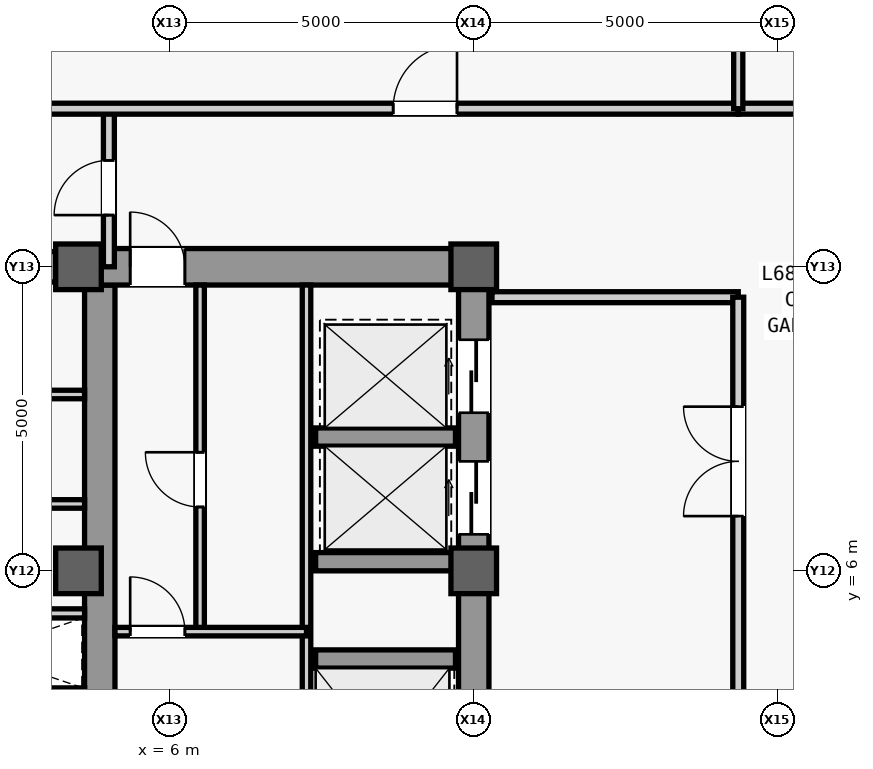
"""IFC4 building model, lengths in metres.
Left out: names, types, materials, properties, quantities, classifications, styles, units other than length and angle.
Written with IfcOpenShell. Run it as: python <this file> out.ifc"""

import sys

from ifc_helpers import new_model, si_unit, direction, frame, frame_2d, origin, origin_2d, place, context, subcontext, project, spatial, rectangle, extrude, source, transform, mapped, element, fill, save


model = new_model("IFC4")
c1 = context("Model", 3, precision=1e-05, world=origin(), true_north=direction((0.0, 1.0)))
c2 = subcontext(c1, "Body", "Model", "MODEL_VIEW")
j1 = project(units=[si_unit("LENGTHUNIT", "METRE"), si_unit("PLANEANGLEUNIT", "RADIAN")], contexts=[c1])
p1 = place(None, origin())
s1 = spatial("IfcSite", under=j1, at=p1, CompositionType="ELEMENT")
p2 = place(p1, origin())
s2 = spatial("IfcBuilding", under=s1, at=p2, CompositionType="ELEMENT")
p3 = place(p2, frame((0.0, 0.0, 289.5)))
s3 = spatial("IfcBuildingStorey", under=s2, at=p3, CompositionType="ELEMENT", Elevation=289.5)
m1 = source(origin(), c2, "Body", "SweptSolid", [
    extrude(rectangle(XDim=22.0, YDim=0.5, at=frame_2d((11.0, 0.0))), origin(), (0.0, 0.0, 1.0), 3.78),
])
p4 = place(p3, frame((11.0, -11.0, 0.0), z_axis=(0.0, 0.0, 1.0), x_axis=(0.0, 1.0, 0.0)))
e1 = element("IfcWall", 1, at=p4, inside=s3, PredefinedType="SHEAR", context=c2, shape_type="MappedRepresentation", body=[
    mapped(m1, transform((0.0, 0.0, 0.0), scale=1.0)),
])
m2 = source(origin(), c2, "Body", "SweptSolid", [
    extrude(rectangle(XDim=1.1, YDim=2.2, at=frame_2d((0.55, 1.1))), frame((0.0, 0.26, 0.0), z_axis=(0.0, -1.0, 0.0), x_axis=(1.0, 0.0, 0.0)), (0.0, 0.0, 1.0), 0.52),
])
p5 = place(p4, frame((0.8, 0.0, 0.0)))
e2 = element("IfcOpeningElement", 2, at=p5, cuts=e1, PredefinedType="OPENING", context=c2, shape_type="MappedRepresentation", body=[
    mapped(m2, transform((0.0, 0.0, 0.0), scale=1.0)),
])
m3 = source(origin(), c2, "Body", "SweptSolid", [
    extrude(rectangle(XDim=0.9, YDim=2.15, at=frame_2d((0.45, 1.075))), frame((0.0, 0.26, 0.0), z_axis=(0.0, -1.0, 0.0), x_axis=(1.0, 0.0, 0.0)), (0.0, 0.0, 1.0), 0.52),
])
p6 = place(p4, frame((7.575, 0.0, 0.0)))
e3 = element("IfcOpeningElement", 3, at=p6, cuts=e1, PredefinedType="OPENING", context=c2, shape_type="MappedRepresentation", body=[
    mapped(m3, transform((0.0, 0.0, 0.0), scale=1.0)),
])
m4 = source(origin(), c2, "Body", "SweptSolid", [
    extrude(rectangle(XDim=1.2, YDim=2.3, at=frame_2d((0.6, 1.15))), frame((0.0, 0.26, 0.0), z_axis=(0.0, -1.0, 0.0), x_axis=(1.0, 0.0, 0.0)), (0.0, 0.0, 1.0), 0.52),
])
p7 = place(p4, frame((17.6, 0.0, 0.0)))
e4 = element("IfcOpeningElement", 4, at=p7, cuts=e1, PredefinedType="OPENING", context=c2, shape_type="MappedRepresentation", body=[
    mapped(m4, transform((0.0, 0.0, 0.0), scale=1.0)),
])
p8 = place(p4, frame((19.6, 0.0, 0.0)))
e5 = element("IfcOpeningElement", 5, at=p8, cuts=e1, PredefinedType="OPENING", context=c2, shape_type="MappedRepresentation", body=[
    mapped(m4, transform((0.0, 0.0, 0.0), scale=1.0)),
])
m5 = source(origin(), c2, "Body", "SweptSolid", [
    extrude(rectangle(XDim=1.3, YDim=2.3, at=frame_2d((0.65, 1.15))), frame((0.0, 0.26, 0.0), z_axis=(0.0, -1.0, 0.0), x_axis=(1.0, 0.0, 0.0)), (0.0, 0.0, 1.0), 0.52),
])
p9 = place(p4, frame((2.7, 0.0, 0.0)))
e6 = element("IfcOpeningElement", 6, at=p9, cuts=e1, PredefinedType="OPENING", context=c2, shape_type="MappedRepresentation", body=[
    mapped(m5, transform((0.0, 0.0, 0.0), scale=1.0)),
])
p10 = place(p4, frame((13.35, 0.0, 0.0)))
e7 = element("IfcOpeningElement", 7, at=p10, cuts=e1, PredefinedType="OPENING", context=c2, shape_type="MappedRepresentation", body=[
    mapped(m5, transform((0.0, 0.0, 0.0), scale=1.0)),
])
m6 = source(origin(), c2, "Body", "SweptSolid", [
    extrude(rectangle(XDim=21.4, YDim=0.5, at=frame_2d((10.7, 0.0))), origin(), (0.0, 0.0, 1.0), 3.78),
])
p11 = place(p3, frame((4.85, -10.7, 0.0), z_axis=(0.0, 0.0, 1.0), x_axis=(0.0, 1.0, 0.0)))
e8 = element("IfcWall", 8, at=p11, inside=s3, PredefinedType="SHEAR", context=c2, shape_type="MappedRepresentation", body=[
    mapped(m6, transform((0.0, 0.0, 0.0), scale=1.0)),
])
m7 = source(origin(), c2, "Body", "SweptSolid", [
    extrude(rectangle(XDim=5.9, YDim=0.6, at=frame_2d((2.95, 0.0))), origin(), (0.0, 0.0, 1.0), 3.78),
])
p12 = place(p3, frame((4.85, 11.0, 0.0), z_axis=(0.0, 0.0, 1.0), x_axis=(1.0, 0.0, 0.0)))
e9 = element("IfcWall", 9, at=p12, inside=s3, PredefinedType="SHEAR", context=c2, shape_type="MappedRepresentation", body=[
    mapped(m7, transform((0.0, 0.0, 0.0), scale=1.0)),
])
m8 = source(origin(), c2, "Body", "SweptSolid", [
    extrude(rectangle(XDim=0.9, YDim=2.15, at=frame_2d((0.45, 1.075))), frame((0.0, 0.31, 0.0), z_axis=(0.0, -1.0, 0.0), x_axis=(1.0, 0.0, 0.0)), (0.0, 0.0, 1.0), 0.62),
])
p13 = place(p12, frame((0.5, 0.0, 0.0)))
e10 = element("IfcOpeningElement", 10, at=p13, cuts=e9, PredefinedType="OPENING", context=c2, shape_type="MappedRepresentation", body=[
    mapped(m8, transform((0.0, 0.0, 0.0), scale=1.0)),
])
m9 = source(origin(), c2, "Body", "SweptSolid", [
    extrude(rectangle(XDim=9.2, YDim=0.5, at=frame_2d((4.6, 0.0))), origin(), (0.0, 0.0, 1.0), 3.78),
])
p14 = place(p3, frame((-4.6, 11.0, 0.0), z_axis=(0.0, 0.0, 1.0), x_axis=(1.0, 0.0, 0.0)))
e11 = element("IfcWall", 11, at=p14, inside=s3, PredefinedType="SHEAR", context=c2, shape_type="MappedRepresentation", body=[
    mapped(m9, transform((0.0, 0.0, 0.0), scale=1.0)),
])
m10 = source(origin(), c2, "Body", "SweptSolid", [
    extrude(rectangle(XDim=0.75, YDim=0.75, at=origin_2d()), origin(), (0.0, 0.0, 1.0), 4.0),
])
for number, where, z_axis, x_axis in (
    (12, (4.5, 6.0, 0.0), (0.0, 0.0, 1.0), (1.0, 0.0, 0.0)),
    (13, (4.5, 11.0, 0.0), (0.0, 0.0, 1.0), (1.0, 0.0, 0.0)),
    (14, (11.0, 6.0, 0.0), (0.0, 0.0, 1.0), (1.0, 0.0, 0.0)),
    (15, (11.0, 11.0, 0.0), (0.0, 0.0, 1.0), (1.0, 0.0, 0.0)),
):
    element("IfcColumn", number, at=place(p3, frame(where, z_axis=z_axis, x_axis=x_axis)), inside=s3, PredefinedType="COLUMN", context=c2, shape_type="MappedRepresentation", body=[
        mapped(m10, transform((0.0, 0.0, 0.0), scale=1.0)),
    ])
m11 = source(origin(), c2, "Body", "SweptSolid", [
    extrude(rectangle(XDim=2.3, YDim=0.3, at=frame_2d((1.15, 0.0))), origin(), (0.0, 0.0, 1.0), 3.78),
])
for number, where, z_axis, x_axis in (
    (16, (8.4, 4.55, 0.0), (0.0, 0.0, 1.0), (1.0, 0.0, 0.0)),
    (17, (8.4, 6.15, 0.0), (0.0, 0.0, 1.0), (1.0, 0.0, 0.0)),
    (18, (8.4, 8.2, 0.0), (0.0, 0.0, 1.0), (1.0, 0.0, 0.0)),
):
    element("IfcWall", number, at=place(p3, frame(where, z_axis=z_axis, x_axis=x_axis)), inside=s3, PredefinedType="SHEAR", context=c2, shape_type="MappedRepresentation", body=[
        mapped(m11, transform((0.0, 0.0, 0.0), scale=1.0)),
    ])
m12 = source(origin(), c2, "Body", "SweptSolid", [
    extrude(rectangle(XDim=9.4, YDim=0.14, at=frame_2d((4.7, 0.0))), origin(), (0.0, 0.0, 1.0), 3.78),
])
p15 = place(p3, frame((8.25, 1.3, 0.0), z_axis=(0.0, 0.0, 1.0), x_axis=(0.0, 1.0, 0.0)))
e19 = element("IfcWall", 19, at=p15, inside=s3, PredefinedType="PARTITIONING", context=c2, shape_type="MappedRepresentation", body=[
    mapped(m12, transform((0.0, 0.0, 0.0), scale=1.0)),
])
m13 = source(origin(), c2, "Body", "SweptSolid", [
    extrude(rectangle(XDim=5.7, YDim=0.14, at=frame_2d((2.85, 0.0))), origin(), (0.0, 0.0, 1.0), 3.78),
])
p16 = place(p3, frame((6.5, 5.0, 0.0), z_axis=(0.0, 0.0, 1.0), x_axis=(0.0, 1.0, 0.0)))
e20 = element("IfcWall", 20, at=p16, inside=s3, PredefinedType="PARTITIONING", context=c2, shape_type="MappedRepresentation", body=[
    mapped(m13, transform((0.0, 0.0, 0.0), scale=1.0)),
])
m14 = source(origin(), c2, "Body", "SweptSolid", [
    extrude(rectangle(XDim=0.9, YDim=2.15, at=frame_2d((0.45, 1.075))), frame((0.0, 0.08, 0.0), z_axis=(0.0, -1.0, 0.0), x_axis=(1.0, 0.0, 0.0)), (0.0, 0.0, 1.0), 0.16),
])
p17 = place(p16, frame((2.05, 0.0, 0.0)))
e21 = element("IfcOpeningElement", 21, at=p17, cuts=e20, PredefinedType="OPENING", context=c2, shape_type="MappedRepresentation", body=[
    mapped(m14, transform((0.0, 0.0, 0.0), scale=1.0)),
])
m15 = source(origin(), c2, "Body", "SweptSolid", [
    extrude(rectangle(XDim=3.15, YDim=0.14, at=frame_2d((1.575, 0.0))), origin(), (0.0, 0.0, 1.0), 3.78),
])
p18 = place(p3, frame((5.1, 5.0, 0.0), z_axis=(0.0, 0.0, 1.0), x_axis=(1.0, 0.0, 0.0)))
e22 = element("IfcWall", 22, at=p18, inside=s3, PredefinedType="PARTITIONING", context=c2, shape_type="MappedRepresentation", body=[
    mapped(m15, transform((0.0, 0.0, 0.0), scale=1.0)),
])
p19 = place(p18, frame((0.25, 0.0, 0.0)))
e23 = element("IfcOpeningElement", 23, at=p19, cuts=e22, PredefinedType="OPENING", context=c2, shape_type="MappedRepresentation", body=[
    mapped(m14, transform((0.0, 0.0, 0.0), scale=1.0)),
])
m16 = source(origin(), c2, "Body", "SweptSolid", [
    extrude(rectangle(XDim=4.05, YDim=0.18, at=frame_2d((2.025, 0.0))), origin(), (0.0, 0.0, 1.0), 3.78),
])
p20 = place(p3, frame((11.3, 10.5, 0.0), z_axis=(0.0, 0.0, 1.0), x_axis=(1.0, 0.0, 0.0)))
e24 = element("IfcWall", 24, at=p20, inside=s3, PredefinedType="PARTITIONING", context=c2, shape_type="MappedRepresentation", body=[
    mapped(m16, transform((0.0, 0.0, 0.0), scale=1.0)),
])
m17 = source(origin(), c2, "Body", "SweptSolid", [
    extrude(rectangle(XDim=16.6, YDim=0.18, at=frame_2d((8.3, 0.0))), origin(), (0.0, 0.0, 1.0), 3.78),
])
p21 = place(p3, frame((15.35, -6.1, 0.0), z_axis=(0.0, 0.0, 1.0), x_axis=(0.0, 1.0, 0.0)))
e25 = element("IfcWall", 25, at=p21, inside=s3, PredefinedType="PARTITIONING", context=c2, shape_type="MappedRepresentation", body=[
    mapped(m17, transform((0.0, 0.0, 0.0), scale=1.0)),
])
m18 = source(origin(), c2, "Body", "SweptSolid", [
    extrude(rectangle(XDim=1.8, YDim=2.25, at=frame_2d((0.9, 1.125))), frame((0.0, 0.1, 0.0), z_axis=(0.0, -1.0, 0.0), x_axis=(1.0, 0.0, 0.0)), (0.0, 0.0, 1.0), 0.2),
])
p22 = place(p21, frame((2.7, 0.0, 0.0)))
e26 = element("IfcOpeningElement", 26, at=p22, cuts=e25, PredefinedType="OPENING", context=c2, shape_type="MappedRepresentation", body=[
    mapped(m18, transform((0.0, 0.0, 0.0), scale=1.0)),
])
p23 = place(p21, frame((13.0, 0.0, 0.0)))
e27 = element("IfcOpeningElement", 27, at=p23, cuts=e25, PredefinedType="OPENING", context=c2, shape_type="MappedRepresentation", body=[
    mapped(m18, transform((0.0, 0.0, 0.0), scale=1.0)),
])
m19 = source(origin(), c2, "Body", "SweptSolid", [
    extrude(rectangle(XDim=3.45, YDim=0.15, at=frame_2d((1.725, 0.0))), origin(), (0.0, 0.0, 1.0), 3.78),
])
p24 = place(p3, frame((1.15, 4.0, 0.0), z_axis=(0.0, 0.0, 1.0), x_axis=(1.0, 0.0, 0.0)))
e28 = element("IfcWall", 28, at=p24, inside=s3, PredefinedType="PARTITIONING", context=c2, shape_type="MappedRepresentation", body=[
    mapped(m19, transform((0.0, 0.0, 0.0), scale=1.0)),
])
m20 = source(origin(), c2, "Body", "SweptSolid", [
    extrude(rectangle(XDim=3.45, YDim=0.14, at=frame_2d((1.725, 0.0))), origin(), (0.0, 0.0, 1.0), 3.78),
])
for number, where, z_axis, x_axis in (
    (29, (1.15, 7.1, 0.0), (0.0, 0.0, 1.0), (1.0, 0.0, 0.0)),
    (30, (1.15, 8.9, 0.0), (0.0, 0.0, 1.0), (1.0, 0.0, 0.0)),
):
    element("IfcWall", number, at=place(p3, frame(where, z_axis=z_axis, x_axis=x_axis)), inside=s3, PredefinedType="PARTITIONING", context=c2, shape_type="MappedRepresentation", body=[
        mapped(m20, transform((0.0, 0.0, 0.0), scale=1.0)),
    ])
p25 = place(p3, frame((1.15, 5.3, 0.0), z_axis=(0.0, 0.0, 1.0), x_axis=(1.0, 0.0, 0.0)))
e31 = element("IfcWall", 31, at=p25, inside=s3, PredefinedType="PARTITIONING", context=c2, shape_type="MappedRepresentation", body=[
    mapped(m19, transform((0.0, 0.0, 0.0), scale=1.0)),
])
m21 = source(origin(), c2, "Body", "SweptSolid", [
    extrude(rectangle(XDim=2.6, YDim=0.18, at=frame_2d((1.3, 0.0))), origin(), (0.0, 0.0, 1.0), 3.78),
])
p26 = place(p3, frame((5.0, 11.0, 0.0), z_axis=(0.0, 0.0, 1.0), x_axis=(0.0, 1.0, 0.0)))
e32 = element("IfcWall", 32, at=p26, inside=s3, PredefinedType="PARTITIONING", context=c2, shape_type="MappedRepresentation", body=[
    mapped(m21, transform((0.0, 0.0, 0.0), scale=1.0)),
])
m22 = source(origin(), c2, "Body", "SweptSolid", [
    extrude(rectangle(XDim=0.9, YDim=2.15, at=frame_2d((0.45, 1.075))), frame((0.0, 0.1, 0.0), z_axis=(0.0, -1.0, 0.0), x_axis=(1.0, 0.0, 0.0)), (0.0, 0.0, 1.0), 0.2),
])
p27 = place(p26, frame((0.85, 0.0, 0.0)))
e33 = element("IfcOpeningElement", 33, at=p27, cuts=e32, PredefinedType="OPENING", context=c2, shape_type="MappedRepresentation", body=[
    mapped(m22, transform((0.0, 0.0, 0.0), scale=1.0)),
])
m23 = source(origin(), c2, "Body", "SweptSolid", [
    extrude(rectangle(XDim=2.4, YDim=0.18, at=frame_2d((1.2, 0.0))), origin(), (0.0, 0.0, 1.0), 3.78),
])
p28 = place(p3, frame((15.35, 13.6, 0.0), z_axis=(0.0, 0.0, 1.0), x_axis=(1.0, 0.0, 0.0)))
e34 = element("IfcWall", 34, at=p28, inside=s3, PredefinedType="PARTITIONING", context=c2, shape_type="MappedRepresentation", body=[
    mapped(m23, transform((0.0, 0.0, 0.0), scale=1.0)),
])
m24 = source(origin(), c2, "Body", "SweptSolid", [
    extrude(rectangle(XDim=32.75, YDim=0.18, at=frame_2d((16.375, 0.0))), origin(), (0.0, 0.0, 1.0), 3.78),
])
p29 = place(p3, frame((-17.4, 13.6, 0.0), z_axis=(0.0, 0.0, 1.0), x_axis=(1.0, 0.0, 0.0)))
e35 = element("IfcWall", 35, at=p29, inside=s3, PredefinedType="PARTITIONING", context=c2, shape_type="MappedRepresentation", body=[
    mapped(m24, transform((0.0, 0.0, 0.0), scale=1.0)),
])
m25 = source(origin(), c2, "Body", "SweptSolid", [
    extrude(rectangle(XDim=1.05, YDim=2.2, at=frame_2d((0.525, 1.1))), frame((0.0, 0.1, 0.0), z_axis=(0.0, -1.0, 0.0), x_axis=(1.0, 0.0, 0.0)), (0.0, 0.0, 1.0), 0.2),
])
p30 = place(p29, frame((27.075, 0.0, 0.0)))
e36 = element("IfcOpeningElement", 36, at=p30, cuts=e35, PredefinedType="OPENING", context=c2, shape_type="MappedRepresentation", body=[
    mapped(m25, transform((0.0, 0.0, 0.0), scale=1.0)),
])
m26 = source(origin(), c2, "Body", "SweptSolid", [
    extrude(rectangle(XDim=14.4, YDim=0.15, at=frame_2d((7.2, 0.0))), origin(), (0.0, 0.0, 1.0), 3.78),
])
p31 = place(p3, frame((15.35, 13.6, 0.0), z_axis=(0.0, 0.0, 1.0), x_axis=(0.0, 1.0, 0.0)))
e37 = element("IfcWall", 37, at=p31, inside=s3, PredefinedType="PARTITIONING", context=c2, shape_type="MappedRepresentation", body=[
    mapped(m26, transform((0.0, 0.0, 0.0), scale=1.0)),
])
m27 = source(origin(), c2, "Body", "SweptSolid", [
    extrude(rectangle(XDim=0.9, YDim=2.15, at=frame_2d((0.45, 1.075))), frame((0.0, 0.025, 0.0), z_axis=(0.0, -1.0, 0.0), x_axis=(1.0, 0.0, 0.0)), (0.0, 0.0, 1.0), 0.05),
])
p32 = place(p13, origin())
e38 = element("IfcDoor", 38, at=p32, inside=s3, OperationType="SINGLE_SWING_LEFT", PredefinedType="DOOR", context=c2, shape_type="MappedRepresentation", body=[
    mapped(m27, transform((0.0, 0.0, 0.0), scale=1.0)),
])
fill(e10, e38)
p33 = place(p17, origin())
e39 = element("IfcDoor", 39, at=p33, inside=s3, OperationType="SINGLE_SWING_RIGHT", PredefinedType="DOOR", context=c2, shape_type="MappedRepresentation", body=[
    mapped(m27, transform((0.0, 0.0, 0.0), scale=1.0)),
])
fill(e21, e39)
p34 = place(p19, origin())
e40 = element("IfcDoor", 40, at=p34, inside=s3, OperationType="SINGLE_SWING_LEFT", PredefinedType="DOOR", context=c2, shape_type="MappedRepresentation", body=[
    mapped(m27, transform((0.0, 0.0, 0.0), scale=1.0)),
])
fill(e23, e40)
m28 = source(origin(), c2, "Body", "SweptSolid", [
    extrude(rectangle(XDim=1.8, YDim=2.25, at=frame_2d((0.9, 1.125))), frame((0.0, 0.025, 0.0), z_axis=(0.0, -1.0, 0.0), x_axis=(1.0, 0.0, 0.0)), (0.0, 0.0, 1.0), 0.05),
])
p35 = place(p23, origin())
e41 = element("IfcDoor", 41, at=p35, inside=s3, OperationType="SINGLE_SWING_LEFT", PredefinedType="DOOR", context=c2, shape_type="MappedRepresentation", body=[
    mapped(m28, transform((0.0, 0.0, 0.0), scale=1.0)),
])
fill(e27, e41)
p36 = place(p27, origin())
e42 = element("IfcDoor", 42, at=p36, inside=s3, OperationType="SINGLE_SWING_LEFT", PredefinedType="DOOR", context=c2, shape_type="MappedRepresentation", body=[
    mapped(m27, transform((0.0, 0.0, 0.0), scale=1.0)),
])
fill(e33, e42)
m29 = source(origin(), c2, "Body", "SweptSolid", [
    extrude(rectangle(XDim=1.05, YDim=2.2, at=frame_2d((0.525, 1.1))), frame((0.0, 0.025, 0.0), z_axis=(0.0, -1.0, 0.0), x_axis=(1.0, 0.0, 0.0)), (0.0, 0.0, 1.0), 0.05),
])
p37 = place(p30, origin())
e43 = element("IfcDoor", 43, at=p37, inside=s3, OperationType="SINGLE_SWING_RIGHT", PredefinedType="DOOR", context=c2, shape_type="MappedRepresentation", body=[
    mapped(m29, transform((0.0, 0.0, 0.0), scale=1.0)),
])
fill(e36, e43)
m30 = source(origin(), c2, "Body", "SweptSolid", [
    extrude(rectangle(XDim=1.2, YDim=2.3, at=frame_2d((0.6, 1.15))), frame((0.0, 0.025, 0.0), z_axis=(0.0, -1.0, 0.0), x_axis=(1.0, 0.0, 0.0)), (0.0, 0.0, 1.0), 0.05),
])
p38 = place(p7, origin())
e44 = element("IfcDoor", 44, at=p38, inside=s3, OperationType="SLIDING_TO_LEFT", PredefinedType="DOOR", context=c2, shape_type="MappedRepresentation", body=[
    mapped(m30, transform((0.0, 0.0, 0.0), scale=1.0)),
])
fill(e4, e44)
p39 = place(p8, origin())
e45 = element("IfcDoor", 45, at=p39, inside=s3, OperationType="SLIDING_TO_LEFT", PredefinedType="DOOR", context=c2, shape_type="MappedRepresentation", body=[
    mapped(m30, transform((0.0, 0.0, 0.0), scale=1.0)),
])
fill(e5, e45)
save(model, sys.argv[1])
